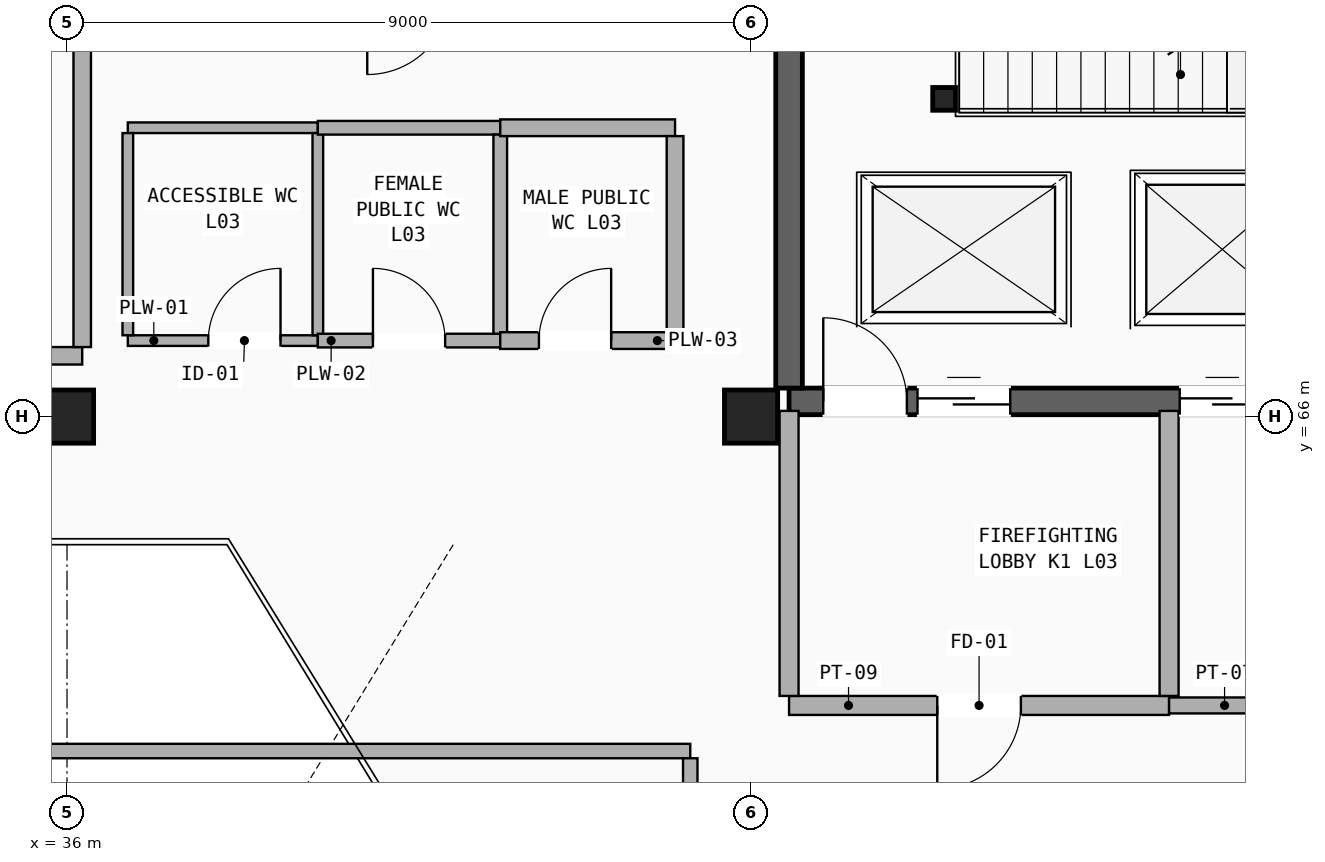
"""IFC4 building model, lengths in metres.
Left out: names, types, materials, properties, quantities, classifications, styles, units other than length and angle.
Written with IfcOpenShell. Run it as: python <this file> out.ifc"""

import sys

from ifc_helpers import new_model, si_unit, direction, frame, frame_2d, origin, origin_2d, place, context, subcontext, project, spatial, rectangle, hollow_rectangle, extrude, element, fill, save


model = new_model("IFC4")
c1 = context("Model", 3, precision=1e-05, world=origin(), true_north=direction((0.0, 1.0)))
c2 = subcontext(c1, "Body", "Model", "MODEL_VIEW")
j1 = project(units=[si_unit("LENGTHUNIT", "METRE"), si_unit("PLANEANGLEUNIT", "RADIAN")], contexts=[c1])
p1 = place(None, origin())
s1 = spatial("IfcSite", under=j1, at=p1, CompositionType="ELEMENT")
p2 = place(p1, origin())
s2 = spatial("IfcBuilding", under=s1, at=p2, CompositionType="ELEMENT")
p3 = place(p2, frame((0.0, 0.0, 13.6)))
s3 = spatial("IfcBuildingStorey", under=s2, at=p3, CompositionType="ELEMENT", Elevation=13.6)
for number, where, z_axis, x_axis in (
    (1, (36.0, 66.0, 0.0), (0.0, 0.0, 1.0), (1.0, 0.0, 0.0)),
    (2, (45.0, 66.0, 0.0), (0.0, 0.0, 1.0), (1.0, 0.0, 0.0)),
):
    element("IfcColumn", number, at=place(p3, frame(where, z_axis=z_axis, x_axis=x_axis)), inside=s3, PredefinedType="COLUMN", context=c2, shape_type="SweptSolid", body=[
        extrude(rectangle(XDim=0.7, YDim=0.7, at=origin_2d()), origin(), (0.0, 0.0, 1.0), 4.08),
    ])
p4 = place(p3, frame((45.5, 66.2, 0.0), z_axis=(0.0, 0.0, 1.0), x_axis=(1.0, 0.0, 0.0)))
e3 = element("IfcWall", 3, at=p4, inside=s3, PredefinedType="SHEAR", context=c2, shape_type="SweptSolid", body=[
    extrude(rectangle(XDim=10.3, YDim=0.35, at=frame_2d((5.15, 0.0))), origin(), (0.0, 0.0, 1.0), 4.08),
])
p5 = place(p4, frame((0.45, 0.0, 0.0)))
e4 = element("IfcOpeningElement", 4, at=p5, cuts=e3, PredefinedType="OPENING", context=c2, shape_type="SweptSolid", body=[
    extrude(rectangle(XDim=1.1, YDim=2.2, at=frame_2d((0.55, 1.1))), frame((0.0, 0.185, 0.0), z_axis=(0.0, -1.0, 0.0), x_axis=(1.0, 0.0, 0.0)), (0.0, 0.0, 1.0), 0.37),
])
p6 = place(p4, frame((1.69, 0.0, 0.0)))
e5 = element("IfcOpeningElement", 5, at=p6, cuts=e3, PredefinedType="OPENING", context=c2, shape_type="SweptSolid", body=[
    extrude(rectangle(XDim=1.22, YDim=2.2, at=frame_2d((0.61, 1.1))), frame((0.0, 0.185, 0.0), z_axis=(0.0, -1.0, 0.0), x_axis=(1.0, 0.0, 0.0)), (0.0, 0.0, 1.0), 0.37),
])
p7 = place(p4, frame((5.14, 0.0, 0.0)))
e6 = element("IfcOpeningElement", 6, at=p7, cuts=e3, PredefinedType="OPENING", context=c2, shape_type="SweptSolid", body=[
    extrude(rectangle(XDim=1.12, YDim=2.16, at=frame_2d((0.56, 1.08))), frame((0.0, 0.185, 0.0), z_axis=(0.0, -1.0, 0.0), x_axis=(1.0, 0.0, 0.0)), (0.0, 0.0, 1.0), 0.37),
])
p8 = place(p3, frame((45.5, 66.375, 0.0), z_axis=(0.0, 0.0, 1.0), x_axis=(0.0, 1.0, 0.0)))
e7 = element("IfcWall", 7, at=p8, inside=s3, PredefinedType="SHEAR", context=c2, shape_type="SweptSolid", body=[
    extrude(rectangle(XDim=8.25, YDim=0.35, at=frame_2d((4.125, 0.0))), origin(), (0.0, 0.0, 1.0), 4.08),
])
p9 = place(p3, frame((47.54, 70.18, 0.0), z_axis=(0.0, 0.0, 1.0), x_axis=(1.0, 0.0, 0.0)))
e8 = element("IfcColumn", 8, at=p9, inside=s3, PredefinedType="COLUMN", context=c2, shape_type="SweptSolid", body=[
    extrude(hollow_rectangle(XDim=0.3, YDim=0.3, WallThickness=0.016, InnerFilletRadius=0.016, OuterFilletRadius=0.032, at=origin_2d()), origin(), (0.0, 0.0, 1.0), 4.08),
])
p10 = place(p3, frame((45.5, 62.2, 0.0), z_axis=(0.0, 0.0, 1.0), x_axis=(1.0, 0.0, 0.0)))
e9 = element("IfcWall", 9, at=p10, inside=s3, PredefinedType="PARTITIONING", context=c2, shape_type="SweptSolid", body=[
    extrude(rectangle(XDim=5.0, YDim=0.25, at=frame_2d((2.5, 0.0))), origin(), (0.0, 0.0, 1.0), 3.84),
])
p11 = place(p10, frame((1.95, 0.0, 0.0)))
e10 = element("IfcOpeningElement", 10, at=p11, cuts=e9, PredefinedType="OPENING", context=c2, shape_type="SweptSolid", body=[
    extrude(rectangle(XDim=1.1, YDim=2.2, at=frame_2d((0.55, 1.1))), frame((0.0, 0.135, 0.0), z_axis=(0.0, -1.0, 0.0), x_axis=(1.0, 0.0, 0.0)), (0.0, 0.0, 1.0), 0.27),
])
for number, where, z_axis, x_axis in (
    (11, (45.5, 62.325, 0.0), (0.0, 0.0, 1.0), (0.0, 1.0, 0.0)),
    (12, (50.5, 62.325, 0.0), (0.0, 0.0, 1.0), (0.0, 1.0, 0.0)),
):
    element("IfcWall", number, at=place(p3, frame(where, z_axis=z_axis, x_axis=x_axis)), inside=s3, PredefinedType="PARTITIONING", context=c2, shape_type="SweptSolid", body=[
        extrude(rectangle(XDim=3.75, YDim=0.25, at=frame_2d((1.875, 0.0))), origin(), (0.0, 0.0, 1.0), 3.07),
    ])
p12 = place(p3, frame((50.5, 62.2, 0.0), z_axis=(0.0, 0.0, 1.0), x_axis=(1.0, 0.0, 0.0)))
e13 = element("IfcWall", 13, at=p12, inside=s3, PredefinedType="PARTITIONING", context=c2, shape_type="SweptSolid", body=[
    extrude(rectangle(XDim=5.3, YDim=0.21, at=frame_2d((2.65, 0.0))), origin(), (0.0, 0.0, 1.0), 3.17),
])
p13 = place(p12, frame((1.95, 0.0, 0.0)))
e14 = element("IfcOpeningElement", 14, at=p13, cuts=e13, PredefinedType="OPENING", context=c2, shape_type="SweptSolid", body=[
    extrude(rectangle(XDim=1.4, YDim=2.2, at=frame_2d((0.7, 1.1))), frame((0.0, 0.115, 0.0), z_axis=(0.0, -1.0, 0.0), x_axis=(1.0, 0.0, 0.0)), (0.0, 0.0, 1.0), 0.23),
])
p14 = place(p3, frame((36.8, 67.0, 0.0), z_axis=(0.0, 0.0, 1.0), x_axis=(1.0, 0.0, 0.0)))
e15 = element("IfcWall", 15, at=p14, inside=s3, PredefinedType="PLUMBINGWALL", context=c2, shape_type="SweptSolid", body=[
    extrude(rectangle(XDim=2.5, YDim=0.14, at=frame_2d((1.25, 0.0))), origin(), (0.0, 0.0, 1.0), 3.84),
])
p15 = place(p14, frame((1.059, 0.0, 0.0)))
e16 = element("IfcOpeningElement", 16, at=p15, cuts=e15, PredefinedType="OPENING", context=c2, shape_type="SweptSolid", body=[
    extrude(rectangle(XDim=0.95, YDim=2.15, at=frame_2d((0.475, 1.075))), frame((0.0, 0.08, 0.0), z_axis=(0.0, -1.0, 0.0), x_axis=(1.0, 0.0, 0.0)), (0.0, 0.0, 1.0), 0.16),
])
p16 = place(p3, frame((36.8, 69.8, 0.0), z_axis=(0.0, 0.0, 1.0), x_axis=(1.0, 0.0, 0.0)))
e17 = element("IfcWall", 17, at=p16, inside=s3, PredefinedType="PLUMBINGWALL", context=c2, shape_type="SweptSolid", body=[
    extrude(rectangle(XDim=2.5, YDim=0.14, at=frame_2d((1.25, 0.0))), origin(), (0.0, 0.0, 1.0), 3.84),
])
for number, where, z_axis, x_axis in (
    (18, (36.8, 67.07, 0.0), (0.0, 0.0, 1.0), (0.0, 1.0, 0.0)),
    (19, (39.3, 67.07, 0.0), (0.0, 0.0, 1.0), (0.0, 1.0, 0.0)),
):
    element("IfcWall", number, at=place(p3, frame(where, z_axis=z_axis, x_axis=x_axis)), inside=s3, PredefinedType="PLUMBINGWALL", context=c2, shape_type="SweptSolid", body=[
        extrude(rectangle(XDim=2.66, YDim=0.14, at=frame_2d((1.33, 0.0))), origin(), (0.0, 0.0, 1.0), 3.84),
    ])
p17 = place(p3, frame((39.3, 67.0, 0.0), z_axis=(0.0, 0.0, 1.0), x_axis=(1.0, 0.0, 0.0)))
e20 = element("IfcWall", 20, at=p17, inside=s3, PredefinedType="PLUMBINGWALL", context=c2, shape_type="SweptSolid", body=[
    extrude(rectangle(XDim=2.4, YDim=0.18, at=frame_2d((1.2, 0.0))), origin(), (0.0, 0.0, 1.0), 3.84),
])
p18 = place(p17, frame((0.725, 0.0, 0.0)))
e21 = element("IfcOpeningElement", 21, at=p18, cuts=e20, PredefinedType="OPENING", context=c2, shape_type="SweptSolid", body=[
    extrude(rectangle(XDim=0.95, YDim=2.15, at=frame_2d((0.475, 1.075))), frame((0.0, 0.1, 0.0), z_axis=(0.0, -1.0, 0.0), x_axis=(1.0, 0.0, 0.0)), (0.0, 0.0, 1.0), 0.2),
])
p19 = place(p3, frame((39.3, 69.8, 0.0), z_axis=(0.0, 0.0, 1.0), x_axis=(1.0, 0.0, 0.0)))
e22 = element("IfcWall", 22, at=p19, inside=s3, PredefinedType="PLUMBINGWALL", context=c2, shape_type="SweptSolid", body=[
    extrude(rectangle(XDim=2.4, YDim=0.18, at=frame_2d((1.2, 0.0))), origin(), (0.0, 0.0, 1.0), 3.84),
])
p20 = place(p3, frame((41.7, 67.09, 0.0), z_axis=(0.0, 0.0, 1.0), x_axis=(0.0, 1.0, 0.0)))
e23 = element("IfcWall", 23, at=p20, inside=s3, PredefinedType="PLUMBINGWALL", context=c2, shape_type="SweptSolid", body=[
    extrude(rectangle(XDim=2.62, YDim=0.18, at=frame_2d((1.31, 0.0))), origin(), (0.0, 0.0, 1.0), 3.84),
])
p21 = place(p3, frame((41.7, 67.0, 0.0), z_axis=(0.0, 0.0, 1.0), x_axis=(1.0, 0.0, 0.0)))
e24 = element("IfcWall", 24, at=p21, inside=s3, PredefinedType="PLUMBINGWALL", context=c2, shape_type="SweptSolid", body=[
    extrude(rectangle(XDim=2.3, YDim=0.22, at=frame_2d((1.15, 0.0))), origin(), (0.0, 0.0, 1.0), 3.84),
])
p22 = place(p21, frame((0.509, 0.0, 0.0)))
e25 = element("IfcOpeningElement", 25, at=p22, cuts=e24, PredefinedType="OPENING", context=c2, shape_type="SweptSolid", body=[
    extrude(rectangle(XDim=0.95, YDim=2.15, at=frame_2d((0.475, 1.075))), frame((0.0, 0.12, 0.0), z_axis=(0.0, -1.0, 0.0), x_axis=(1.0, 0.0, 0.0)), (0.0, 0.0, 1.0), 0.24),
])
p23 = place(p3, frame((41.7, 69.8, 0.0), z_axis=(0.0, 0.0, 1.0), x_axis=(1.0, 0.0, 0.0)))
e26 = element("IfcWall", 26, at=p23, inside=s3, PredefinedType="PLUMBINGWALL", context=c2, shape_type="SweptSolid", body=[
    extrude(rectangle(XDim=2.3, YDim=0.22, at=frame_2d((1.15, 0.0))), origin(), (0.0, 0.0, 1.0), 3.84),
])
p24 = place(p3, frame((44.0, 67.11, 0.0), z_axis=(0.0, 0.0, 1.0), x_axis=(0.0, 1.0, 0.0)))
e27 = element("IfcWall", 27, at=p24, inside=s3, PredefinedType="PLUMBINGWALL", context=c2, shape_type="SweptSolid", body=[
    extrude(rectangle(XDim=2.58, YDim=0.22, at=frame_2d((1.29, 0.0))), origin(), (0.0, 0.0, 1.0), 3.84),
])
p25 = place(p3, frame((27.6, 66.8, 0.0), z_axis=(0.0, 0.0, 1.0), x_axis=(1.0, 0.0, 0.0)))
e28 = element("IfcWall", 28, at=p25, inside=s3, PredefinedType="PARTITIONING", context=c2, shape_type="SweptSolid", body=[
    extrude(rectangle(XDim=8.6, YDim=0.23, at=frame_2d((4.3, 0.0))), origin(), (0.0, 0.0, 1.0), 3.12),
])
p26 = place(p25, frame((3.7, 0.0, 0.0)))
e29 = element("IfcOpeningElement", 29, at=p26, cuts=e28, PredefinedType="OPENING", context=c2, shape_type="SweptSolid", body=[
    extrude(rectangle(XDim=1.2, YDim=2.2, at=frame_2d((0.6, 1.1))), frame((0.0, 0.125, 0.0), z_axis=(0.0, -1.0, 0.0), x_axis=(1.0, 0.0, 0.0)), (0.0, 0.0, 1.0), 0.25),
])
p27 = place(p3, frame((36.2, 66.915, 0.0), z_axis=(0.0, 0.0, 1.0), x_axis=(0.0, 1.0, 0.0)))
e30 = element("IfcWall", 30, at=p27, inside=s3, PredefinedType="PARTITIONING", context=c2, shape_type="SweptSolid", body=[
    extrude(rectangle(XDim=7.17, YDim=0.23, at=frame_2d((3.585, 0.0))), origin(), (0.0, 0.0, 1.0), 3.12),
])
p28 = place(p3, frame((31.0, 61.6, 0.0), z_axis=(0.0, 0.0, 1.0), x_axis=(1.0, 0.0, 0.0)))
e31 = element("IfcWall", 31, at=p28, inside=s3, PredefinedType="PARTITIONING", context=c2, shape_type="SweptSolid", body=[
    extrude(rectangle(XDim=13.2, YDim=0.19, at=frame_2d((6.6, 0.0))), origin(), (0.0, 0.0, 1.0), 2.97),
])
p29 = place(p3, frame((44.2, 46.695, 0.0), z_axis=(0.0, 0.0, 1.0), x_axis=(0.0, 1.0, 0.0)))
e32 = element("IfcWall", 32, at=p29, inside=s3, PredefinedType="PARTITIONING", context=c2, shape_type="SweptSolid", body=[
    extrude(rectangle(XDim=14.81, YDim=0.19, at=frame_2d((7.405, 0.0))), origin(), (0.0, 0.0, 1.0), 2.97),
])
p30 = place(p5, origin())
e33 = element("IfcDoor", 33, at=p30, inside=s3, OperationType="SINGLE_SWING_LEFT", PredefinedType="DOOR", context=c2, shape_type="SweptSolid", body=[
    extrude(rectangle(XDim=1.1, YDim=2.2, at=frame_2d((0.55, 1.1))), frame((0.0, 0.025, 0.0), z_axis=(0.0, -1.0, 0.0), x_axis=(1.0, 0.0, 0.0)), (0.0, 0.0, 1.0), 0.05),
])
fill(e4, e33)
p31 = place(p6, origin())
e34 = element("IfcDoor", 34, at=p31, inside=s3, OperationType="SLIDING_TO_LEFT", PredefinedType="DOOR", context=c2, shape_type="SweptSolid", body=[
    extrude(rectangle(XDim=1.22, YDim=2.2, at=frame_2d((0.61, 1.1))), frame((0.0, 0.025, 0.0), z_axis=(0.0, -1.0, 0.0), x_axis=(1.0, 0.0, 0.0)), (0.0, 0.0, 1.0), 0.05),
])
fill(e5, e34)
p32 = place(p7, origin())
e35 = element("IfcDoor", 35, at=p32, inside=s3, OperationType="SLIDING_TO_LEFT", PredefinedType="DOOR", context=c2, shape_type="SweptSolid", body=[
    extrude(rectangle(XDim=1.12, YDim=2.16, at=frame_2d((0.56, 1.08))), frame((0.0, 0.025, 0.0), z_axis=(0.0, -1.0, 0.0), x_axis=(1.0, 0.0, 0.0)), (0.0, 0.0, 1.0), 0.05),
])
fill(e6, e35)
p33 = place(p11, frame((1.1, 0.0, 0.0), z_axis=(0.0, 0.0, 1.0), x_axis=(-1.0, 0.0, 0.0)))
e36 = element("IfcDoor", 36, at=p33, inside=s3, OperationType="SINGLE_SWING_RIGHT", PredefinedType="DOOR", context=c2, shape_type="SweptSolid", body=[
    extrude(rectangle(XDim=1.1, YDim=2.2, at=frame_2d((0.55, 1.1))), frame((0.0, 0.025, 0.0), z_axis=(0.0, -1.0, 0.0), x_axis=(1.0, 0.0, 0.0)), (0.0, 0.0, 1.0), 0.05),
])
fill(e10, e36)
p34 = place(p15, origin())
e37 = element("IfcDoor", 37, at=p34, inside=s3, OperationType="SINGLE_SWING_RIGHT", PredefinedType="DOOR", context=c2, shape_type="SweptSolid", body=[
    extrude(rectangle(XDim=0.95, YDim=2.15, at=frame_2d((0.475, 1.075))), frame((0.0, 0.025, 0.0), z_axis=(0.0, -1.0, 0.0), x_axis=(1.0, 0.0, 0.0)), (0.0, 0.0, 1.0), 0.05),
])
fill(e16, e37)
p35 = place(p18, origin())
e38 = element("IfcDoor", 38, at=p35, inside=s3, OperationType="SINGLE_SWING_LEFT", PredefinedType="DOOR", context=c2, shape_type="SweptSolid", body=[
    extrude(rectangle(XDim=0.95, YDim=2.15, at=frame_2d((0.475, 1.075))), frame((0.0, 0.025, 0.0), z_axis=(0.0, -1.0, 0.0), x_axis=(1.0, 0.0, 0.0)), (0.0, 0.0, 1.0), 0.05),
])
fill(e21, e38)
p36 = place(p22, origin())
e39 = element("IfcDoor", 39, at=p36, inside=s3, OperationType="SINGLE_SWING_RIGHT", PredefinedType="DOOR", context=c2, shape_type="SweptSolid", body=[
    extrude(rectangle(XDim=0.95, YDim=2.15, at=frame_2d((0.475, 1.075))), frame((0.0, 0.025, 0.0), z_axis=(0.0, -1.0, 0.0), x_axis=(1.0, 0.0, 0.0)), (0.0, 0.0, 1.0), 0.05),
])
fill(e25, e39)
save(model, sys.argv[1])
